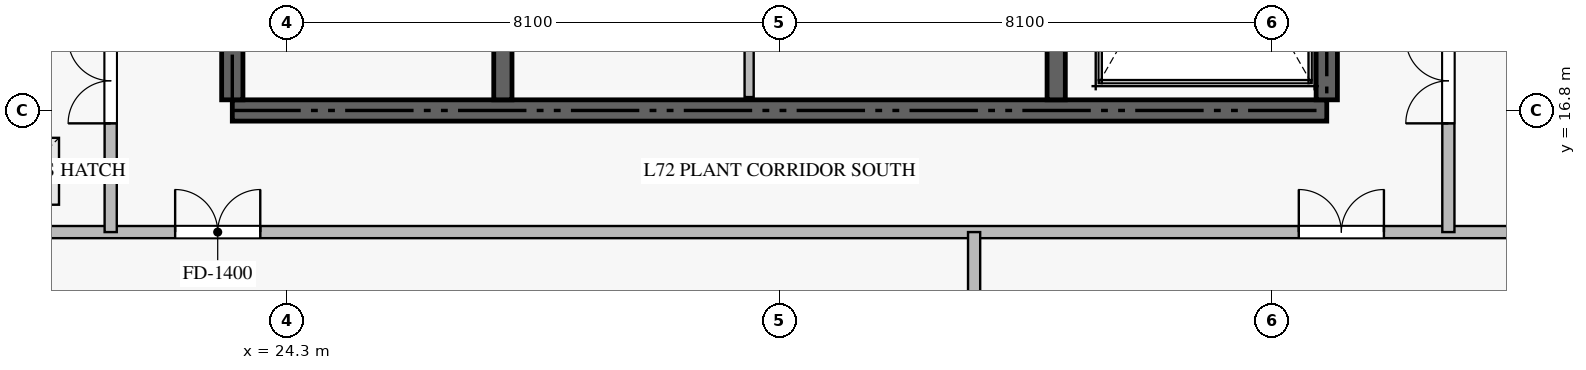
"""IFC4 building model, lengths in metres.
Left out: names, types, materials, properties, quantities, classifications, styles, units other than length and angle.
Written with IfcOpenShell. Run it as: python <this file> out.ifc"""

import sys

from ifc_helpers import new_model, si_unit, direction, frame, frame_2d, origin, origin_2d, place, context, subcontext, project, spatial, rectangle, extrude, source, transform, mapped, element, fill, save


model = new_model("IFC4")
c1 = context("Model", 3, precision=1e-05, world=origin(), true_north=direction((0.0, 1.0)))
c2 = subcontext(c1, "Body", "Model", "MODEL_VIEW")
j1 = project(units=[si_unit("LENGTHUNIT", "METRE"), si_unit("PLANEANGLEUNIT", "RADIAN")], contexts=[c1])
p1 = place(None, origin())
s1 = spatial("IfcSite", under=j1, at=p1, CompositionType="ELEMENT")
p2 = place(p1, origin())
s2 = spatial("IfcBuilding", under=s1, at=p2, CompositionType="ELEMENT")
p3 = place(p2, frame((0.0, 0.0, 287.45)))
s3 = spatial("IfcBuildingStorey", under=s2, at=p3, CompositionType="ELEMENT", Elevation=287.45)
p4 = place(p3, frame((23.4, 16.8, -0.44), z_axis=(0.0, 0.0, 1.0), x_axis=(1.0, 0.0, 0.0)))
e1 = element("IfcWall", 1, at=p4, inside=s3, PredefinedType="SHEAR", context=c2, shape_type="SweptSolid", body=[
    extrude(rectangle(XDim=18.0, YDim=0.35, at=frame_2d((9.0, 0.0))), origin(), (0.0, 0.0, 1.0), 6.178),
])
p5 = place(p3, frame((23.4, 16.975, -0.44), z_axis=(0.0, 0.0, 1.0), x_axis=(0.0, 1.0, 0.0)))
e2 = element("IfcWall", 2, at=p5, inside=s3, PredefinedType="SHEAR", context=c2, shape_type="SweptSolid", body=[
    extrude(rectangle(XDim=4.875, YDim=0.35, at=frame_2d((2.438, 0.0))), origin(), (0.0, 0.0, 1.0), 6.178),
])
p6 = place(p3, frame((41.4, 16.975, -0.44), z_axis=(0.0, 0.0, 1.0), x_axis=(0.0, 1.0, 0.0)))
e3 = element("IfcWall", 3, at=p6, inside=s3, PredefinedType="SHEAR", context=c2, shape_type="SweptSolid", body=[
    extrude(rectangle(XDim=8.375, YDim=0.35, at=frame_2d((4.188, 0.0))), origin(), (0.0, 0.0, 1.0), 6.178),
])
p7 = place(p3, frame((27.85, 16.975, -0.44), z_axis=(0.0, 0.0, 1.0), x_axis=(0.0, 1.0, 0.0)))
e4 = element("IfcWall", 4, at=p7, inside=s3, PredefinedType="SHEAR", context=c2, shape_type="SweptSolid", body=[
    extrude(rectangle(XDim=4.875, YDim=0.3, at=frame_2d((2.438, 0.0))), origin(), (0.0, 0.0, 1.0), 6.178),
])
p8 = place(p3, frame((36.95, 16.975, -0.44), z_axis=(0.0, 0.0, 1.0), x_axis=(0.0, 1.0, 0.0)))
e5 = element("IfcWall", 5, at=p8, inside=s3, PredefinedType="SHEAR", context=c2, shape_type="SweptSolid", body=[
    extrude(rectangle(XDim=8.375, YDim=0.3, at=frame_2d((4.188, 0.0))), origin(), (0.0, 0.0, 1.0), 6.178),
])
p9 = place(p3, frame((31.9, 17.02, 0.0), z_axis=(0.0, 0.0, 1.0), x_axis=(0.0, 1.0, 0.0)))
e6 = element("IfcWall", 6, at=p9, inside=s3, PredefinedType="PARTITIONING", context=c2, shape_type="SweptSolid", body=[
    extrude(rectangle(XDim=2.73, YDim=0.15, at=frame_2d((1.365, 0.0))), origin(), (0.0, 0.0, 1.0), 5.74),
])
p10 = place(p3, frame((15.2, 14.8, 0.0), z_axis=(0.0, 0.0, 1.0), x_axis=(1.0, 0.0, 0.0)))
e7 = element("IfcWall", 7, at=p10, inside=s3, PredefinedType="STANDARD", context=c2, shape_type="SweptSolid", body=[
    extrude(rectangle(XDim=34.4, YDim=0.2, at=frame_2d((17.2, 0.0))), origin(), (0.0, 0.0, 1.0), 5.74),
])
p11 = place(p10, frame((7.26, 0.0, 0.0)))
e8 = element("IfcOpeningElement", 8, at=p11, cuts=e7, PredefinedType="OPENING", context=c2, shape_type="SweptSolid", body=[
    extrude(rectangle(XDim=1.4, YDim=2.2, at=frame_2d((0.7, 1.1))), frame((0.0, 0.11, 0.0), z_axis=(0.0, -1.0, 0.0), x_axis=(1.0, 0.0, 0.0)), (0.0, 0.0, 1.0), 0.22),
])
p12 = place(p10, frame((25.74, 0.0, 0.0)))
e9 = element("IfcOpeningElement", 9, at=p12, cuts=e7, PredefinedType="OPENING", context=c2, shape_type="SweptSolid", body=[
    extrude(rectangle(XDim=1.4, YDim=2.2, at=frame_2d((0.7, 1.1))), frame((0.0, 0.11, 0.0), z_axis=(0.0, -1.0, 0.0), x_axis=(1.0, 0.0, 0.0)), (0.0, 0.0, 1.0), 0.22),
])
p13 = place(p3, frame((35.6, 9.0, 0.0), z_axis=(0.0, 0.0, 1.0), x_axis=(0.0, 1.0, 0.0)))
e10 = element("IfcWall", 10, at=p13, inside=s3, PredefinedType="STANDARD", context=c2, shape_type="SweptSolid", body=[
    extrude(rectangle(XDim=5.8, YDim=0.2, at=frame_2d((2.9, 0.0))), origin(), (0.0, 0.0, 1.0), 5.74),
])
p14 = place(p3, frame((21.4, 14.8, 0.0), z_axis=(0.0, 0.0, 1.0), x_axis=(0.0, 1.0, 0.0)))
e11 = element("IfcWall", 11, at=p14, inside=s3, PredefinedType="STANDARD", context=c2, shape_type="SweptSolid", body=[
    extrude(rectangle(XDim=8.85, YDim=0.2, at=frame_2d((4.425, 0.0))), origin(), (0.0, 0.0, 1.0), 5.74),
])
p15 = place(p14, frame((1.788, 0.0, 0.0)))
e12 = element("IfcOpeningElement", 12, at=p15, cuts=e11, PredefinedType="OPENING", context=c2, shape_type="SweptSolid", body=[
    extrude(rectangle(XDim=1.4, YDim=2.2, at=frame_2d((0.7, 1.1))), frame((0.0, 0.11, 0.0), z_axis=(0.0, -1.0, 0.0), x_axis=(1.0, 0.0, 0.0)), (0.0, 0.0, 1.0), 0.22),
])
p16 = place(p3, frame((43.4, 14.8, 0.0), z_axis=(0.0, 0.0, 1.0), x_axis=(0.0, 1.0, 0.0)))
e13 = element("IfcWall", 13, at=p16, inside=s3, PredefinedType="STANDARD", context=c2, shape_type="SweptSolid", body=[
    extrude(rectangle(XDim=8.85, YDim=0.2, at=frame_2d((4.425, 0.0))), origin(), (0.0, 0.0, 1.0), 5.74),
])
p17 = place(p16, frame((1.788, 0.0, 0.0)))
e14 = element("IfcOpeningElement", 14, at=p17, cuts=e13, PredefinedType="OPENING", context=c2, shape_type="SweptSolid", body=[
    extrude(rectangle(XDim=1.4, YDim=2.2, at=frame_2d((0.7, 1.1))), frame((0.0, 0.11, 0.0), z_axis=(0.0, -1.0, 0.0), x_axis=(1.0, 0.0, 0.0)), (0.0, 0.0, 1.0), 0.22),
])
p18 = place(p2, frame((0.0, 0.0, 293.45)))
p19 = place(p18, frame((0.0, 0.0, -0.26)))
p20 = place(p19, frame((20.0, 15.8, 0.0)))
p21 = place(p20, frame((0.0, 0.0, 0.22)))
e15 = element("IfcDoor", 15, at=p21, inside=s3, OperationType="SINGLE_SWING_LEFT", PredefinedType="TRAPDOOR", context=c2, shape_type="SweptSolid", body=[
    extrude(rectangle(XDim=1.1, YDim=1.1, at=origin_2d()), origin(), (0.0, 0.0, 1.0), 0.04),
])
m1 = source(origin(), c2, "Body", "SweptSolid", [
    extrude(rectangle(XDim=1.4, YDim=2.2, at=frame_2d((0.7, 1.1))), frame((0.0, 0.025, 0.0), z_axis=(0.0, -1.0, 0.0), x_axis=(1.0, 0.0, 0.0)), (0.0, 0.0, 1.0), 0.05),
])
p22 = place(p11, origin())
e16 = element("IfcDoor", 16, at=p22, inside=s3, OperationType="DOUBLE_DOOR_SINGLE_SWING", PredefinedType="DOOR", context=c2, shape_type="MappedRepresentation", body=[
    mapped(m1, transform((0.0, 0.0, 0.0), scale=1.0)),
])
fill(e8, e16)
p23 = place(p12, origin())
e17 = element("IfcDoor", 17, at=p23, inside=s3, OperationType="DOUBLE_DOOR_SINGLE_SWING", PredefinedType="DOOR", context=c2, shape_type="MappedRepresentation", body=[
    mapped(m1, transform((0.0, 0.0, 0.0), scale=1.0)),
])
fill(e9, e17)
p24 = place(p15, origin())
e18 = element("IfcDoor", 18, at=p24, inside=s3, OperationType="DOUBLE_DOOR_SINGLE_SWING", PredefinedType="DOOR", context=c2, shape_type="MappedRepresentation", body=[
    mapped(m1, transform((0.0, 0.0, 0.0), scale=1.0)),
])
fill(e12, e18)
p25 = place(p17, origin())
e19 = element("IfcDoor", 19, at=p25, inside=s3, OperationType="DOUBLE_DOOR_SINGLE_SWING", PredefinedType="DOOR", context=c2, shape_type="MappedRepresentation", body=[
    mapped(m1, transform((0.0, 0.0, 0.0), scale=1.0)),
])
fill(e14, e19)
save(model, sys.argv[1])
